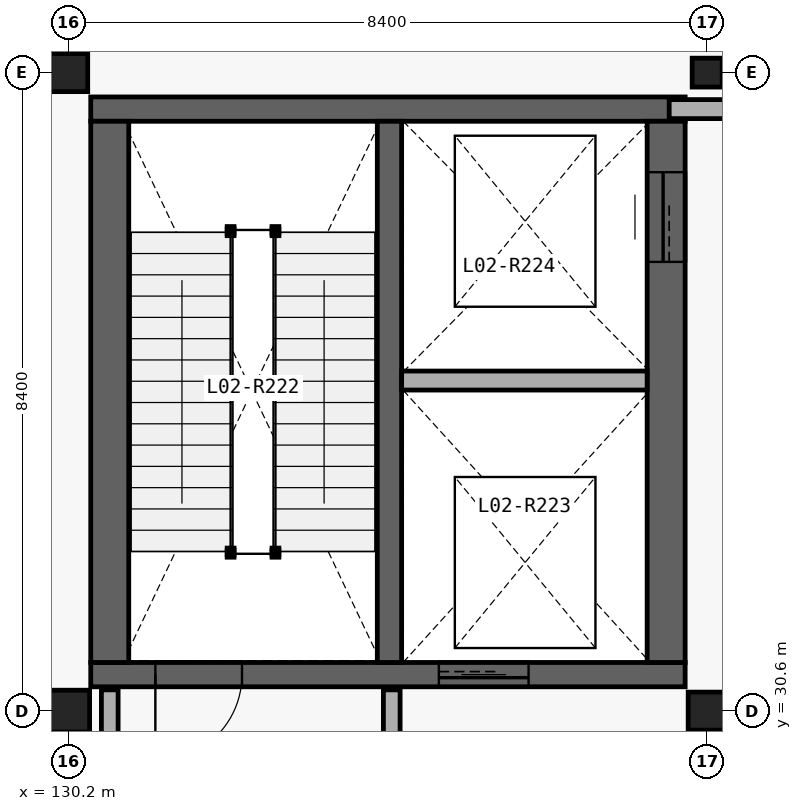
"""IFC4 building model, lengths in metres.
Left out: names, types, materials, properties, quantities, classifications, styles, units other than length and angle.
Written with IfcOpenShell. Run it as: python <this file> out.ifc"""

import sys

from ifc_helpers import new_model, si_unit, direction, frame, frame_2d, origin_with_axes, origin_2d_with_axis, place, context, subcontext, project, spatial, rectangle, i_section, extrude, element, fill, save


model = new_model("IFC4")
c1 = context("Model", 3, precision=1e-05, world=origin_with_axes(), true_north=direction((0.0, 1.0)))
c2 = subcontext(c1, "Body", "Model", "MODEL_VIEW")
j1 = project(units=[si_unit("LENGTHUNIT", "METRE"), si_unit("PLANEANGLEUNIT", "RADIAN")], contexts=[c1])
p1 = place(None, origin_with_axes())
s1 = spatial("IfcSite", under=j1, at=p1, CompositionType="ELEMENT")
p2 = place(p1, origin_with_axes())
s2 = spatial("IfcBuilding", under=s1, at=p2, CompositionType="ELEMENT")
p3 = place(p2, frame((0.0, 0.0, 10.8), z_axis=(0.0, 0.0, 1.0), x_axis=(1.0, 0.0, 0.0)))
s3 = spatial("IfcBuildingStorey", under=s2, at=p3, CompositionType="ELEMENT", Elevation=10.8)
p4 = place(None, frame((130.49, 31.08, 10.8), z_axis=(0.0, 0.0, 1.0), x_axis=(1.0, 0.0, 0.0)))
e1 = element("IfcWall", 1, at=p4, inside=s3, PredefinedType="SHEAR", context=c2, shape_type="SweptSolid", body=[
    extrude(rectangle(XDim=7.82, YDim=0.32, at=frame_2d((3.91, 0.0), x_axis=(1.0, 0.0))), origin_with_axes(), (0.0, 0.0, 1.0), 4.8),
])
p5 = place(None, frame((131.91, 31.08, 10.8), z_axis=(0.0, 0.0, 1.0), x_axis=(1.0, 0.0, 0.0)))
e2 = element("IfcOpeningElement", 2, at=p5, cuts=e1, PredefinedType="OPENING", context=c2, shape_type="SweptSolid", body=[
    extrude(rectangle(XDim=1.14, YDim=2.18, at=frame_2d((0.0, 1.09), x_axis=(1.0, 0.0))), frame((0.0, 0.17, 0.0), z_axis=(0.0, -1.0, 0.0), x_axis=(1.0, 0.0, 0.0)), (0.0, 0.0, 1.0), 0.34),
])
p6 = place(None, frame((135.66, 31.08, 10.8), z_axis=(0.0, 0.0, 1.0), x_axis=(1.0, 0.0, 0.0)))
e3 = element("IfcOpeningElement", 3, at=p6, cuts=e1, PredefinedType="OPENING", context=c2, shape_type="SweptSolid", body=[
    extrude(rectangle(XDim=1.18, YDim=2.24, at=frame_2d((0.0, 1.12), x_axis=(1.0, 0.0))), frame((0.0, 0.17, 0.0), z_axis=(0.0, -1.0, 0.0), x_axis=(1.0, 0.0, 0.0)), (0.0, 0.0, 1.0), 0.34),
])
p7 = place(None, frame((138.31, 38.52, 10.8), z_axis=(0.0, 0.0, 1.0), x_axis=(-1.0, 0.0, 0.0)))
e4 = element("IfcWall", 4, at=p7, inside=s3, PredefinedType="SHEAR", context=c2, shape_type="SweptSolid", body=[
    extrude(rectangle(XDim=7.82, YDim=0.32, at=frame_2d((3.91, 0.0), x_axis=(1.0, 0.0))), origin_with_axes(), (0.0, 0.0, 1.0), 4.8),
])
p8 = place(None, frame((138.06, 31.24, 10.8), z_axis=(0.0, 0.0, 1.0), x_axis=(0.0, 1.0, 0.0)))
e5 = element("IfcWall", 5, at=p8, inside=s3, PredefinedType="SHEAR", context=c2, shape_type="SweptSolid", body=[
    extrude(rectangle(XDim=7.12, YDim=0.5, at=frame_2d((3.56, 0.0), x_axis=(1.0, 0.0))), origin_with_axes(), (0.0, 0.0, 1.0), 4.8),
])
p9 = place(None, frame((138.06, 37.1, 10.8), z_axis=(0.0, 0.0, 1.0), x_axis=(0.0, 1.0, 0.0)))
e6 = element("IfcOpeningElement", 6, at=p9, cuts=e5, PredefinedType="OPENING", context=c2, shape_type="SweptSolid", body=[
    extrude(rectangle(XDim=1.18, YDim=2.24, at=frame_2d((0.0, 1.12), x_axis=(1.0, 0.0))), frame((0.0, 0.26, 0.0), z_axis=(0.0, -1.0, 0.0), x_axis=(1.0, 0.0, 0.0)), (0.0, 0.0, 1.0), 0.52),
])
p10 = place(None, frame((130.74, 38.36, 10.8), z_axis=(0.0, 0.0, 1.0), x_axis=(0.0, -1.0, 0.0)))
e7 = element("IfcWall", 7, at=p10, inside=s3, PredefinedType="SHEAR", context=c2, shape_type="SweptSolid", body=[
    extrude(rectangle(XDim=7.12, YDim=0.5, at=frame_2d((3.56, 0.0), x_axis=(1.0, 0.0))), origin_with_axes(), (0.0, 0.0, 1.0), 4.8),
])
p11 = place(None, frame((134.42, 31.24, 10.8), z_axis=(0.0, 0.0, 1.0), x_axis=(0.0, 1.0, 0.0)))
e8 = element("IfcWall", 8, at=p11, inside=s3, PredefinedType="SHEAR", context=c2, shape_type="SweptSolid", body=[
    extrude(rectangle(XDim=7.12, YDim=0.32, at=frame_2d((3.56, 0.0), x_axis=(1.0, 0.0))), origin_with_axes(), (0.0, 0.0, 1.0), 4.8),
])
p12 = place(None, frame((134.58, 34.949, 10.8), z_axis=(0.0, 0.0, 1.0), x_axis=(1.0, 0.0, 0.0)))
e9 = element("IfcWall", 9, at=p12, inside=s3, PredefinedType="PARTITIONING", context=c2, shape_type="SweptSolid", body=[
    extrude(rectangle(XDim=3.23, YDim=0.25, at=frame_2d((1.615, 0.0), x_axis=(1.0, 0.0))), origin_with_axes(), (0.0, 0.0, 1.0), 4.44),
])
p13 = place(None, frame((138.1, 38.52, 10.8), z_axis=(0.0, 0.0, 1.0), x_axis=(1.0, 0.0, 0.0)))
e10 = element("IfcWall", 10, at=p13, inside=s3, PredefinedType="PARTITIONING", context=c2, shape_type="SweptSolid", body=[
    extrude(rectangle(XDim=3.36, YDim=0.25, at=frame_2d((1.68, 0.0), x_axis=(1.0, 0.0))), origin_with_axes(), (0.0, 0.0, 1.0), 4.44),
])
for number, where, z_axis, x_axis in (
    (11, (130.74, 29.62, 10.8), (0.0, 0.0, 1.0), (0.0, 1.0, 0.0)),
    (12, (134.45, 29.62, 10.8), (0.0, 0.0, 1.0), (0.0, 1.0, 0.0)),
):
    element("IfcWall", number, at=place(None, frame(where, z_axis=z_axis, x_axis=x_axis)), inside=s3, PredefinedType="PARTITIONING", context=c2, shape_type="SweptSolid", body=[
        extrude(rectangle(XDim=1.26, YDim=0.22, at=frame_2d((0.63, 0.0), x_axis=(1.0, 0.0))), origin_with_axes(), (0.0, 0.0, 1.0), 4.44),
    ])
p14 = place(None, frame((130.2, 30.6, 10.8), z_axis=(0.0, 0.0, 1.0), x_axis=(1.0, 0.0, 0.0)))
e13 = element("IfcColumn", 13, at=p14, inside=s3, PredefinedType="COLUMN", context=c2, shape_type="SweptSolid", body=[
    extrude(i_section(OverallWidth=0.55, OverallDepth=0.55, WebThickness=0.025, FlangeThickness=0.042, at=origin_2d_with_axis()), origin_with_axes(), (0.0, 0.0, 1.0), 4.8),
])
for number, where, z_axis, x_axis in (
    (14, (130.2, 39.0, 10.8), (0.0, 0.0, 1.0), (1.0, 0.0, 0.0)),
    (15, (138.6, 30.6, 10.8), (0.0, 0.0, 1.0), (1.0, 0.0, 0.0)),
):
    element("IfcColumn", number, at=place(None, frame(where, z_axis=z_axis, x_axis=x_axis)), inside=s3, PredefinedType="COLUMN", context=c2, shape_type="SweptSolid", body=[
        extrude(i_section(OverallWidth=0.5, OverallDepth=0.5, WebThickness=0.022, FlangeThickness=0.036, at=origin_2d_with_axis()), origin_with_axes(), (0.0, 0.0, 1.0), 4.8),
    ])
p15 = place(None, frame((138.6, 39.0, 10.8), z_axis=(0.0, 0.0, 1.0), x_axis=(1.0, 0.0, 0.0)))
e16 = element("IfcColumn", 16, at=p15, inside=s3, PredefinedType="COLUMN", context=c2, shape_type="SweptSolid", body=[
    extrude(i_section(OverallWidth=0.395, OverallDepth=0.38, WebThickness=0.019, FlangeThickness=0.03, at=origin_2d_with_axis()), origin_with_axes(), (0.0, 0.0, 1.0), 4.8),
])
p16 = place(None, frame((131.91, 31.08, 10.8), z_axis=(0.0, 0.0, 1.0), x_axis=(-1.0, 0.0, 0.0)))
e17 = element("IfcDoor", 17, at=p16, inside=s3, OperationType="SINGLE_SWING_LEFT", PredefinedType="DOOR", context=c2, shape_type="SweptSolid", body=[
    extrude(rectangle(XDim=1.14, YDim=2.18, at=frame_2d((0.0, 1.09), x_axis=(1.0, 0.0))), frame((0.0, 0.04, 0.0), z_axis=(0.0, -1.0, 0.0), x_axis=(1.0, 0.0, 0.0)), (0.0, 0.0, 1.0), 0.08),
])
fill(e2, e17)
p17 = place(None, frame((135.66, 31.08, 10.8), z_axis=(0.0, 0.0, 1.0), x_axis=(-1.0, 0.0, 0.0)))
e18 = element("IfcDoor", 18, at=p17, inside=s3, OperationType="SLIDING_TO_LEFT", PredefinedType="DOOR", context=c2, shape_type="SweptSolid", body=[
    extrude(rectangle(XDim=1.18, YDim=2.24, at=frame_2d((0.0, 1.12), x_axis=(1.0, 0.0))), frame((0.0, 0.04, 0.0), z_axis=(0.0, -1.0, 0.0), x_axis=(1.0, 0.0, 0.0)), (0.0, 0.0, 1.0), 0.08),
])
fill(e3, e18)
p18 = place(None, frame((138.06, 37.1, 10.8), z_axis=(0.0, 0.0, 1.0), x_axis=(0.0, 1.0, 0.0)))
e19 = element("IfcDoor", 19, at=p18, inside=s3, OperationType="SLIDING_TO_LEFT", PredefinedType="DOOR", context=c2, shape_type="SweptSolid", body=[
    extrude(rectangle(XDim=1.18, YDim=2.24, at=frame_2d((0.0, 1.12), x_axis=(1.0, 0.0))), frame((0.0, 0.04, 0.0), z_axis=(0.0, -1.0, 0.0), x_axis=(1.0, 0.0, 0.0)), (0.0, 0.0, 1.0), 0.08),
])
fill(e6, e19)
save(model, sys.argv[1])
